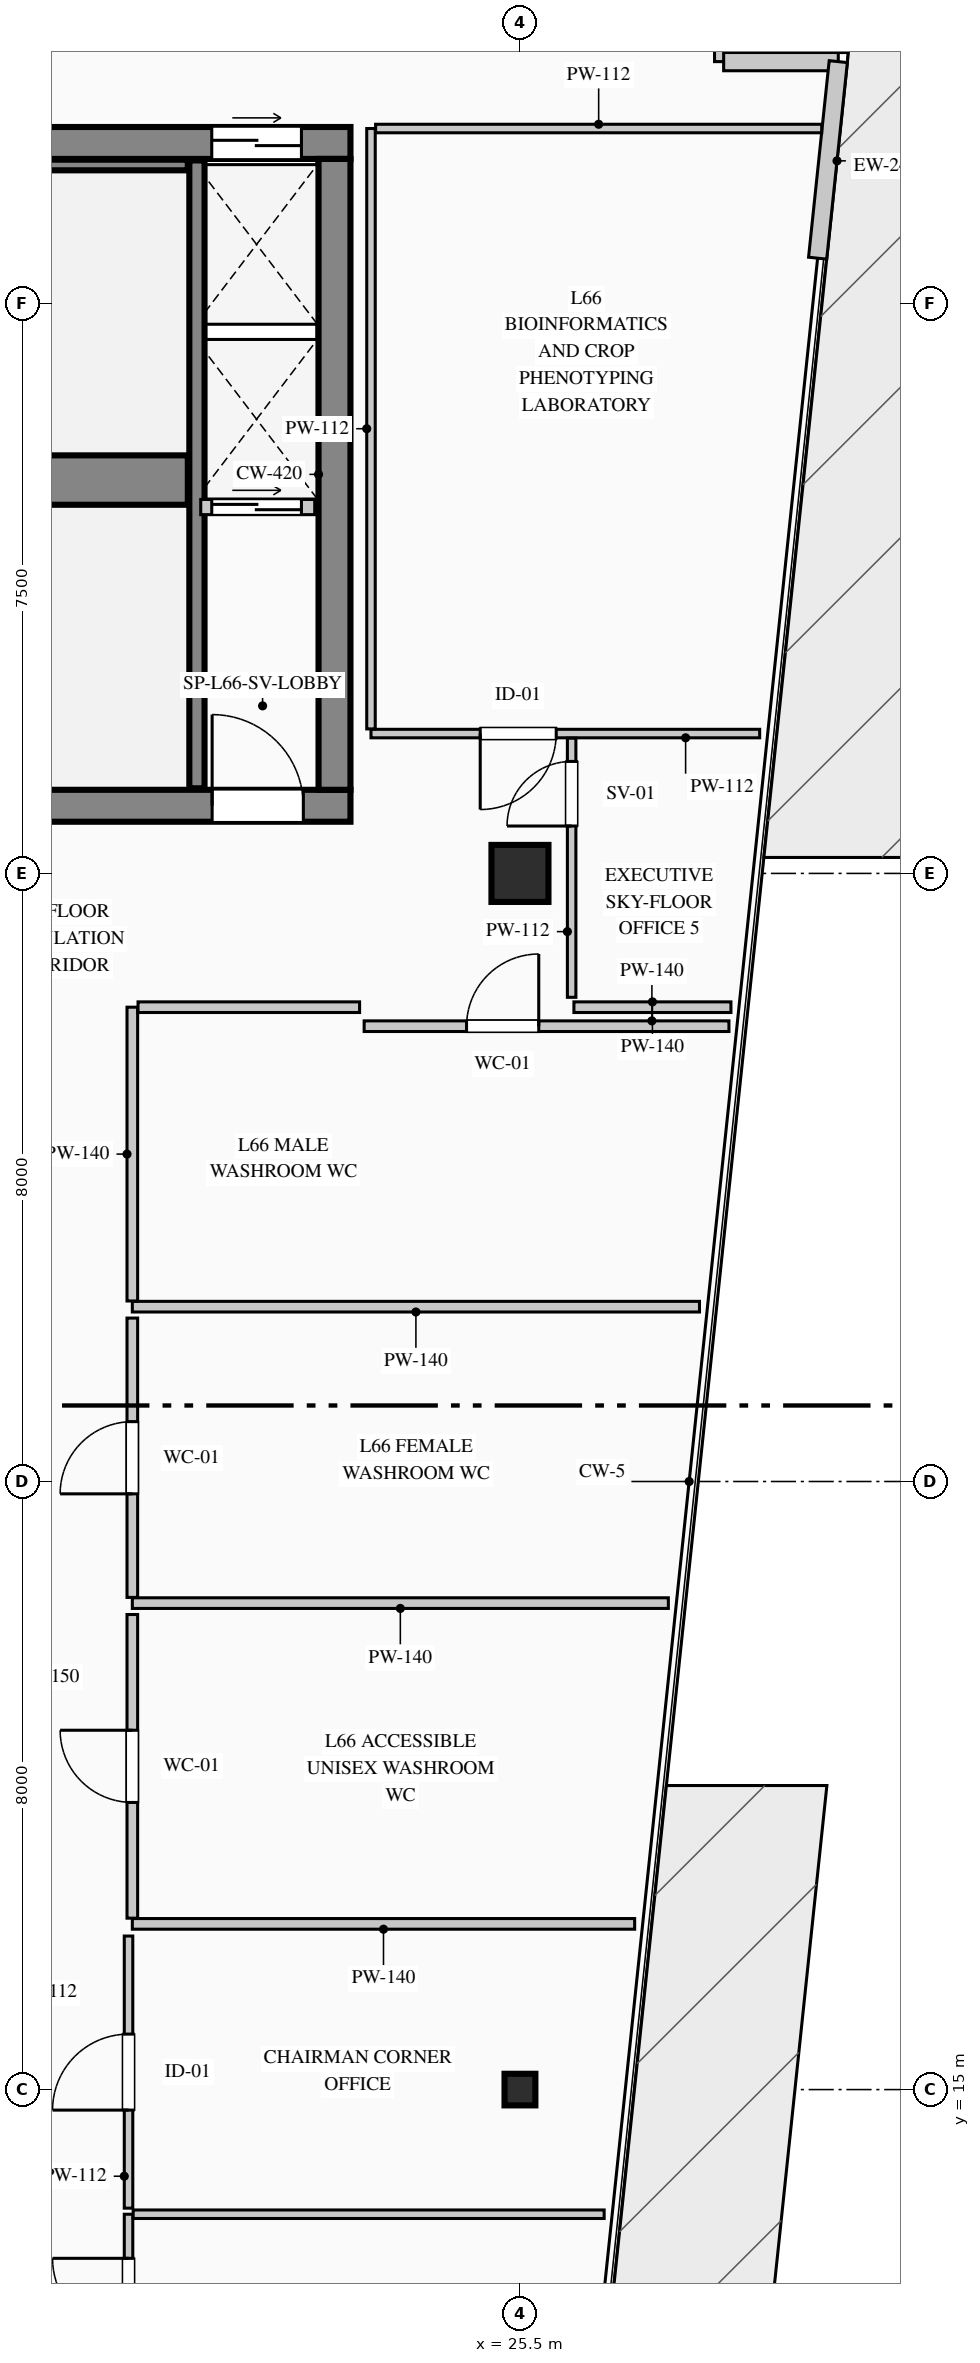
"""IFC4 building model, lengths in metres.
Left out: names, types, materials, properties, quantities, classifications, styles, units other than length and angle.
Written with IfcOpenShell. Run it as: python <this file> out.ifc"""

import sys

from ifc_helpers import new_model, si_unit, direction, frame, frame_2d, origin, origin_2d, place, context, subcontext, project, spatial, rectangle, i_section, extrude, element, fill, save


model = new_model("IFC4")
c1 = context("Model", 3, precision=1e-05, world=origin(), true_north=direction((0.0, 1.0)))
c2 = subcontext(c1, "Body", "Model", "MODEL_VIEW")
j1 = project(units=[si_unit("LENGTHUNIT", "METRE"), si_unit("PLANEANGLEUNIT", "RADIAN")], contexts=[c1])
p1 = place(None, origin())
s1 = spatial("IfcSite", under=j1, at=p1, CompositionType="ELEMENT")
p2 = place(p1, origin())
s2 = spatial("IfcBuilding", under=s1, at=p2, CompositionType="ELEMENT")
p3 = place(p2, frame((0.0, 0.0, 276.45)))
s3 = spatial("IfcBuildingStorey", under=s2, at=p3, CompositionType="ELEMENT", Elevation=276.45)
p4 = place(p3, frame((5.58, 40.61, 0.0), z_axis=(0.0, 0.0, 1.0), x_axis=(1.0, 0.0, 0.0)))
e1 = element("IfcWall", 1, at=p4, inside=s3, PredefinedType="SHEAR", context=c2, shape_type="SweptSolid", body=[
    extrude(rectangle(XDim=17.69, YDim=0.42, at=frame_2d((8.845, 0.0))), origin(), (0.0, 0.0, 1.0), 3.95),
])
p5 = place(p4, frame((15.865, 0.0, 0.0)))
e2 = element("IfcOpeningElement", 2, at=p5, cuts=e1, PredefinedType="OPENING", context=c2, shape_type="SweptSolid", body=[
    extrude(rectangle(XDim=1.18, YDim=2.25, at=frame_2d((0.59, 1.125))), frame((0.0, 0.22, 0.0), z_axis=(0.0, -1.0, 0.0), x_axis=(1.0, 0.0, 0.0)), (0.0, 0.0, 1.0), 0.44),
])
p6 = place(p3, frame((5.58, 31.89, 0.0), z_axis=(0.0, 0.0, 1.0), x_axis=(1.0, 0.0, 0.0)))
e3 = element("IfcWall", 3, at=p6, inside=s3, PredefinedType="SHEAR", context=c2, shape_type="SweptSolid", body=[
    extrude(rectangle(XDim=17.69, YDim=0.42, at=frame_2d((8.845, 0.0))), origin(), (0.0, 0.0, 1.0), 3.95),
])
p7 = place(p6, frame((3.07, 0.0, 0.0)))
e4 = element("IfcOpeningElement", 4, at=p7, cuts=e3, PredefinedType="OPENING", context=c2, shape_type="SweptSolid", body=[
    extrude(rectangle(XDim=1.2, YDim=2.2, at=frame_2d((0.6, 1.1))), frame((0.0, 0.22, 0.0), z_axis=(0.0, -1.0, 0.0), x_axis=(1.0, 0.0, 0.0)), (0.0, 0.0, 1.0), 0.44),
])
p8 = place(p6, frame((6.92, 0.0, 0.0)))
e5 = element("IfcOpeningElement", 5, at=p8, cuts=e3, PredefinedType="OPENING", context=c2, shape_type="SweptSolid", body=[
    extrude(rectangle(XDim=1.2, YDim=2.2, at=frame_2d((0.6, 1.1))), frame((0.0, 0.22, 0.0), z_axis=(0.0, -1.0, 0.0), x_axis=(1.0, 0.0, 0.0)), (0.0, 0.0, 1.0), 0.44),
])
p9 = place(p6, frame((8.77, 0.0, 0.0)))
e6 = element("IfcOpeningElement", 6, at=p9, cuts=e3, PredefinedType="OPENING", context=c2, shape_type="SweptSolid", body=[
    extrude(rectangle(XDim=1.15, YDim=2.2, at=frame_2d((0.575, 1.1))), frame((0.0, 0.22, 0.0), z_axis=(0.0, -1.0, 0.0), x_axis=(1.0, 0.0, 0.0)), (0.0, 0.0, 1.0), 0.44),
])
p10 = place(p6, frame((15.87, 0.0, 0.0)))
e7 = element("IfcOpeningElement", 7, at=p10, cuts=e3, PredefinedType="OPENING", context=c2, shape_type="SweptSolid", body=[
    extrude(rectangle(XDim=1.2, YDim=2.2, at=frame_2d((0.6, 1.1))), frame((0.0, 0.22, 0.0), z_axis=(0.0, -1.0, 0.0), x_axis=(1.0, 0.0, 0.0)), (0.0, 0.0, 1.0), 0.44),
])
p11 = place(p3, frame((23.06, 32.1, 0.0), z_axis=(0.0, 0.0, 1.0), x_axis=(0.0, 1.0, 0.0)))
e8 = element("IfcWall", 8, at=p11, inside=s3, PredefinedType="SHEAR", context=c2, shape_type="SweptSolid", body=[
    extrude(rectangle(XDim=8.3, YDim=0.42, at=frame_2d((4.15, 0.0))), origin(), (0.0, 0.0, 1.0), 3.95),
])
p12 = place(p3, frame((14.12, 36.175, 0.0), z_axis=(0.0, 0.0, 1.0), x_axis=(1.0, 0.0, 0.0)))
e9 = element("IfcWall", 9, at=p12, inside=s3, PredefinedType="SHEAR", context=c2, shape_type="SweptSolid", body=[
    extrude(rectangle(XDim=7.01, YDim=0.65, at=frame_2d((3.505, 0.0))), origin(), (0.0, 0.0, 1.0), 3.95),
])
p13 = place(p3, frame((21.25, 32.12, 0.0), z_axis=(0.0, 0.0, 1.0), x_axis=(0.0, 1.0, 0.0)))
e10 = element("IfcWall", 10, at=p13, inside=s3, PredefinedType="SHEAR", context=c2, shape_type="SweptSolid", body=[
    extrude(rectangle(XDim=8.26, YDim=0.2, at=frame_2d((4.13, 0.0))), origin(), (0.0, 0.0, 1.0), 3.95),
])
p14 = place(p3, frame((14.12, 40.32, 0.0), z_axis=(0.0, 0.0, 1.0), x_axis=(1.0, 0.0, 0.0)))
e11 = element("IfcWall", 11, at=p14, inside=s3, PredefinedType="SHEAR", context=c2, shape_type="SweptSolid", body=[
    extrude(rectangle(XDim=7.01, YDim=0.14, at=frame_2d((3.505, 0.0))), origin(), (0.0, 0.0, 1.0), 3.95),
])
p15 = place(p3, frame((25.5, 15.0, 0.0), z_axis=(0.0, 0.0, 1.0), x_axis=(1.0, 0.0, 0.0)))
e12 = element("IfcColumn", 12, at=p15, inside=s3, PredefinedType="COLUMN", context=c2, shape_type="SweptSolid", body=[
    extrude(i_section(OverallWidth=0.406, OverallDepth=0.416, WebThickness=0.03, FlangeThickness=0.048, FilletRadius=0.015, at=origin_2d()), origin(), (0.0, 0.0, 1.0), 3.95),
])
p16 = place(p3, frame((25.5, 31.0, 0.0), z_axis=(0.0, 0.0, 1.0), x_axis=(1.0, 0.0, 0.0)))
e13 = element("IfcColumn", 13, at=p16, inside=s3, PredefinedType="COLUMN", context=c2, shape_type="SweptSolid", body=[
    extrude(rectangle(XDim=0.75, YDim=0.75, at=origin_2d()), origin(), (0.0, 0.0, 1.0), 3.95),
])
p17 = place(p3, frame((28.18, 43.38, 0.0), z_axis=(0.0, 0.0, 1.0), x_axis=(0.0, -1.0, 0.0)))
e14 = element("IfcWall", 14, at=p17, inside=s3, PredefinedType="STANDARD", context=c2, shape_type="SweptSolid", body=[
    extrude(rectangle(XDim=1.7, YDim=0.24, at=frame_2d((0.85, 0.0))), origin(), (0.0, 0.0, 1.0), 3.7),
])
p18 = place(p3, frame((28.18, 41.68, 0.0), z_axis=(0.0, 0.0, 1.0), x_axis=(1.0, 0.0, 0.0)))
e15 = element("IfcWall", 15, at=p18, inside=s3, PredefinedType="STANDARD", context=c2, shape_type="SweptSolid", body=[
    extrude(rectangle(XDim=1.508, YDim=0.24, at=frame_2d((0.754, 0.0))), origin(), (0.0, 0.0, 1.0), 3.7),
])
p19 = place(p3, frame((29.688, 41.68, 0.0), z_axis=(0.0, 0.0, 1.0), x_axis=(-0.104420821624, -0.994533203071, 0.0)))
e16 = element("IfcWall", 16, at=p19, inside=s3, PredefinedType="STANDARD", context=c2, shape_type="SweptSolid", body=[
    extrude(rectangle(XDim=2.6, YDim=0.24, at=frame_2d((1.3, 0.0))), origin(), (0.0, 0.0, 1.0), 3.7),
])
p20 = place(p3, frame((19.581, 2.62, 0.0), z_axis=(0.0, 0.0, 1.0), x_axis=(-0.077816860153, 0.996967670627, 0.0)))
e17 = element("IfcWall", 17, at=p20, inside=s3, PredefinedType="STANDARD", context=c2, shape_type="SweptSolid", body=[
    extrude(rectangle(XDim=10.281, YDim=0.24, at=frame_2d((5.141, 0.0))), origin(), (0.0, 0.0, 1.0), 3.7),
])
p21 = place(p20, frame((5.755, 0.0, 0.9)))
e18 = element("IfcOpeningElement", 18, at=p21, cuts=e17, PredefinedType="OPENING", context=c2, shape_type="SweptSolid", body=[
    extrude(rectangle(XDim=1.65, YDim=1.95, at=frame_2d((0.825, 0.975))), frame((0.0, 0.13, 0.0), z_axis=(0.0, -1.0, 0.0), x_axis=(1.0, 0.0, 0.0)), (0.0, 0.0, 1.0), 0.26),
])
p22 = place(p3, frame((21.3, 35.82, 0.0), z_axis=(0.0, 0.0, 1.0), x_axis=(1.0, 0.0, 0.0)))
e19 = element("IfcWall", 19, at=p22, inside=s3, PredefinedType="PARTITIONING", context=c2, shape_type="SweptSolid", body=[
    extrude(rectangle(XDim=1.5, YDim=0.2, at=frame_2d((0.75, 0.0))), origin(), (0.0, 0.0, 1.0), 3.7),
])
p23 = place(p22, frame((0.145, 0.0, 0.0)))
e20 = element("IfcOpeningElement", 20, at=p23, cuts=e19, PredefinedType="OPENING", context=c2, shape_type="SweptSolid", body=[
    extrude(rectangle(XDim=1.18, YDim=2.25, at=frame_2d((0.59, 1.125))), frame((0.0, 0.11, 0.0), z_axis=(0.0, -1.0, 0.0), x_axis=(1.0, 0.0, 0.0)), (0.0, 0.0, 1.0), 0.22),
])
p24 = place(p3, frame((28.654, 32.84, 0.0), z_axis=(0.0, 0.0, 1.0), x_axis=(-1.0, 0.0, 0.0)))
e21 = element("IfcWall", 21, at=p24, inside=s3, PredefinedType="PARTITIONING", context=c2, shape_type="SweptSolid", body=[
    extrude(rectangle(XDim=5.114, YDim=0.112, at=frame_2d((2.557, 0.0))), origin(), (0.0, 0.0, 1.0), 3.7),
])
p25 = place(p24, frame((2.677, 0.0, 0.0)))
e22 = element("IfcOpeningElement", 22, at=p25, cuts=e21, PredefinedType="OPENING", context=c2, shape_type="SweptSolid", body=[
    extrude(rectangle(XDim=1.0, YDim=2.15, at=frame_2d((0.5, 1.075))), frame((0.0, 0.066, 0.0), z_axis=(0.0, -1.0, 0.0), x_axis=(1.0, 0.0, 0.0)), (0.0, 0.0, 1.0), 0.132),
])
p26 = place(p3, frame((23.54, 32.901, 0.0), z_axis=(0.0, 0.0, 1.0), x_axis=(0.0, 1.0, 0.0)))
e23 = element("IfcWall", 23, at=p26, inside=s3, PredefinedType="PARTITIONING", context=c2, shape_type="SweptSolid", body=[
    extrude(rectangle(XDim=7.899, YDim=0.112, at=frame_2d((3.95, 0.0))), origin(), (0.0, 0.0, 1.0), 3.7),
])
p27 = place(p3, frame((23.601, 40.8, 0.0), z_axis=(0.0, 0.0, 1.0), x_axis=(1.0, 0.0, 0.0)))
e24 = element("IfcWall", 24, at=p27, inside=s3, PredefinedType="PARTITIONING", context=c2, shape_type="SweptSolid", body=[
    extrude(rectangle(XDim=5.869, YDim=0.112, at=frame_2d((2.935, 0.0))), origin(), (0.0, 0.0, 1.0), 3.7),
])
p28 = place(p3, frame((23.45, 28.99, 0.0), z_axis=(0.0, 0.0, 1.0), x_axis=(1.0, 0.0, 0.0)))
e25 = element("IfcWall", 25, at=p28, inside=s3, PredefinedType="PARTITIONING", context=c2, shape_type="SweptSolid", body=[
    extrude(rectangle(XDim=4.8, YDim=0.14, at=frame_2d((2.4, 0.0))), origin(), (0.0, 0.0, 1.0), 3.7),
])
p29 = place(p28, frame((1.347, 0.0, 0.0)))
e26 = element("IfcOpeningElement", 26, at=p29, cuts=e25, PredefinedType="OPENING", context=c2, shape_type="SweptSolid", body=[
    extrude(rectangle(XDim=0.95, YDim=2.15, at=frame_2d((0.475, 1.075))), frame((0.0, 0.08, 0.0), z_axis=(0.0, -1.0, 0.0), x_axis=(1.0, 0.0, 0.0)), (0.0, 0.0, 1.0), 0.16),
])
p30 = place(p3, frame((26.21, 29.24, 0.0), z_axis=(0.0, 0.0, 1.0), x_axis=(1.0, 0.0, 0.0)))
e27 = element("IfcWall", 27, at=p30, inside=s3, PredefinedType="PARTITIONING", context=c2, shape_type="SweptSolid", body=[
    extrude(rectangle(XDim=2.066, YDim=0.14, at=frame_2d((1.033, 0.0))), origin(), (0.0, 0.0, 1.0), 3.7),
])
p31 = place(p3, frame((27.862, 25.3, 0.0), z_axis=(0.0, 0.0, 1.0), x_axis=(-1.0, 0.0, 0.0)))
e28 = element("IfcWall", 28, at=p31, inside=s3, PredefinedType="PARTITIONING", context=c2, shape_type="SweptSolid", body=[
    extrude(rectangle(XDim=7.462, YDim=0.14, at=frame_2d((3.731, 0.0))), origin(), (0.0, 0.0, 1.0), 3.7),
])
p32 = place(p3, frame((20.4, 25.375, 0.0), z_axis=(0.0, 0.0, 1.0), x_axis=(0.0, 1.0, 0.0)))
e29 = element("IfcWall", 29, at=p32, inside=s3, PredefinedType="PARTITIONING", context=c2, shape_type="SweptSolid", body=[
    extrude(rectangle(XDim=3.865, YDim=0.14, at=frame_2d((1.933, 0.0))), origin(), (0.0, 0.0, 1.0), 3.7),
])
p33 = place(p3, frame((20.475, 29.24, 0.0), z_axis=(0.0, 0.0, 1.0), x_axis=(1.0, 0.0, 0.0)))
e30 = element("IfcWall", 30, at=p33, inside=s3, PredefinedType="PARTITIONING", context=c2, shape_type="SweptSolid", body=[
    extrude(rectangle(XDim=2.915, YDim=0.14, at=frame_2d((1.458, 0.0))), origin(), (0.0, 0.0, 1.0), 3.7),
])
p34 = place(p3, frame((27.452, 21.4, 0.0), z_axis=(0.0, 0.0, 1.0), x_axis=(-1.0, 0.0, 0.0)))
e31 = element("IfcWall", 31, at=p34, inside=s3, PredefinedType="PARTITIONING", context=c2, shape_type="SweptSolid", body=[
    extrude(rectangle(XDim=7.052, YDim=0.14, at=frame_2d((3.526, 0.0))), origin(), (0.0, 0.0, 1.0), 3.7),
])
p35 = place(p3, frame((20.4, 21.475, 0.0), z_axis=(0.0, 0.0, 1.0), x_axis=(0.0, 1.0, 0.0)))
e32 = element("IfcWall", 32, at=p35, inside=s3, PredefinedType="PARTITIONING", context=c2, shape_type="SweptSolid", body=[
    extrude(rectangle(XDim=3.675, YDim=0.14, at=frame_2d((1.837, 0.0))), origin(), (0.0, 0.0, 1.0), 3.7),
])
p36 = place(p35, frame((1.363, 0.0, 0.0)))
e33 = element("IfcOpeningElement", 33, at=p36, cuts=e32, PredefinedType="OPENING", context=c2, shape_type="SweptSolid", body=[
    extrude(rectangle(XDim=0.95, YDim=2.15, at=frame_2d((0.475, 1.075))), frame((0.0, 0.08, 0.0), z_axis=(0.0, -1.0, 0.0), x_axis=(1.0, 0.0, 0.0)), (0.0, 0.0, 1.0), 0.16),
])
p37 = place(p3, frame((27.009, 17.18, 0.0), z_axis=(0.0, 0.0, 1.0), x_axis=(-1.0, 0.0, 0.0)))
e34 = element("IfcWall", 34, at=p37, inside=s3, PredefinedType="PARTITIONING", context=c2, shape_type="SweptSolid", body=[
    extrude(rectangle(XDim=6.609, YDim=0.14, at=frame_2d((3.305, 0.0))), origin(), (0.0, 0.0, 1.0), 3.7),
])
p38 = place(p3, frame((20.4, 17.255, 0.0), z_axis=(0.0, 0.0, 1.0), x_axis=(0.0, 1.0, 0.0)))
e35 = element("IfcWall", 35, at=p38, inside=s3, PredefinedType="PARTITIONING", context=c2, shape_type="SweptSolid", body=[
    extrude(rectangle(XDim=3.995, YDim=0.14, at=frame_2d((1.998, 0.0))), origin(), (0.0, 0.0, 1.0), 3.7),
])
p39 = place(p38, frame((1.522, 0.0, 0.0)))
e36 = element("IfcOpeningElement", 36, at=p39, cuts=e35, PredefinedType="OPENING", context=c2, shape_type="SweptSolid", body=[
    extrude(rectangle(XDim=0.95, YDim=2.15, at=frame_2d((0.475, 1.075))), frame((0.0, 0.08, 0.0), z_axis=(0.0, -1.0, 0.0), x_axis=(1.0, 0.0, 0.0)), (0.0, 0.0, 1.0), 0.16),
])
p40 = place(p3, frame((20.35, 11.2, 0.0), z_axis=(0.0, 0.0, 1.0), x_axis=(0.0, 1.0, 0.0)))
e37 = element("IfcWall", 37, at=p40, inside=s3, PredefinedType="PARTITIONING", context=c2, shape_type="SweptSolid", body=[
    extrude(rectangle(XDim=2.16, YDim=0.112, at=frame_2d((1.08, 0.0))), origin(), (0.0, 0.0, 1.0), 3.7),
])
p41 = place(p40, frame((0.58, 0.0, 0.0)))
e38 = element("IfcOpeningElement", 38, at=p41, cuts=e37, PredefinedType="OPENING", context=c2, shape_type="SweptSolid", body=[
    extrude(rectangle(XDim=1.0, YDim=2.15, at=frame_2d((0.5, 1.075))), frame((0.0, 0.066, 0.0), z_axis=(0.0, -1.0, 0.0), x_axis=(1.0, 0.0, 0.0)), (0.0, 0.0, 1.0), 0.132),
])
p42 = place(p3, frame((20.411, 13.36, 0.0), z_axis=(0.0, 0.0, 1.0), x_axis=(1.0, 0.0, 0.0)))
e39 = element("IfcWall", 39, at=p42, inside=s3, PredefinedType="PARTITIONING", context=c2, shape_type="SweptSolid", body=[
    extrude(rectangle(XDim=6.197, YDim=0.112, at=frame_2d((3.099, 0.0))), origin(), (0.0, 0.0, 1.0), 3.7),
])
p43 = place(p3, frame((20.35, 13.44, 0.0), z_axis=(0.0, 0.0, 1.0), x_axis=(0.0, 1.0, 0.0)))
e40 = element("IfcWall", 40, at=p43, inside=s3, PredefinedType="PARTITIONING", context=c2, shape_type="SweptSolid", body=[
    extrude(rectangle(XDim=3.58, YDim=0.112, at=frame_2d((1.79, 0.0))), origin(), (0.0, 0.0, 1.0), 3.7),
])
p44 = place(p43, frame((1.29, 0.0, 0.0)))
e41 = element("IfcOpeningElement", 41, at=p44, cuts=e40, PredefinedType="OPENING", context=c2, shape_type="SweptSolid", body=[
    extrude(rectangle(XDim=1.0, YDim=2.15, at=frame_2d((0.5, 1.075))), frame((0.0, 0.066, 0.0), z_axis=(0.0, -1.0, 0.0), x_axis=(1.0, 0.0, 0.0)), (0.0, 0.0, 1.0), 0.132),
])
p45 = place(p3, frame((26.18, 29.37, 0.0), z_axis=(0.0, 0.0, 1.0), x_axis=(0.0, 1.0, 0.0)))
e42 = element("IfcWall", 42, at=p45, inside=s3, PredefinedType="PARTITIONING", context=c2, shape_type="SweptSolid", body=[
    extrude(rectangle(XDim=3.409, YDim=0.112, at=frame_2d((1.705, 0.0))), origin(), (0.0, 0.0, 1.0), 3.7),
])
p46 = place(p45, frame((2.253, 0.0, 0.0)))
e43 = element("IfcOpeningElement", 43, at=p46, cuts=e42, PredefinedType="OPENING", context=c2, shape_type="SweptSolid", body=[
    extrude(rectangle(XDim=0.85, YDim=2.1, at=frame_2d((0.425, 1.05))), frame((0.0, 0.066, 0.0), z_axis=(0.0, -1.0, 0.0), x_axis=(1.0, 0.0, 0.0)), (0.0, 0.0, 1.0), 0.132),
])
p47 = place(p10, origin())
e44 = element("IfcDoor", 44, at=p47, inside=s3, OperationType="SINGLE_SWING_LEFT", PredefinedType="DOOR", context=c2, shape_type="SweptSolid", body=[
    extrude(rectangle(XDim=1.2, YDim=2.2, at=frame_2d((0.6, 1.1))), frame((0.0, 0.025, 0.0), z_axis=(0.0, -1.0, 0.0), x_axis=(1.0, 0.0, 0.0)), (0.0, 0.0, 1.0), 0.05),
])
fill(e7, e44)
p48 = place(p5, origin())
e45 = element("IfcDoor", 45, at=p48, inside=s3, OperationType="DOUBLE_DOOR_SLIDING", PredefinedType="DOOR", context=c2, shape_type="SweptSolid", body=[
    extrude(rectangle(XDim=1.18, YDim=2.25, at=frame_2d((0.59, 1.125))), frame((0.0, 0.025, 0.0), z_axis=(0.0, -1.0, 0.0), x_axis=(1.0, 0.0, 0.0)), (0.0, 0.0, 1.0), 0.05),
])
fill(e2, e45)
p49 = place(p23, origin())
e46 = element("IfcDoor", 46, at=p49, inside=s3, OperationType="DOUBLE_DOOR_SLIDING", PredefinedType="DOOR", context=c2, shape_type="SweptSolid", body=[
    extrude(rectangle(XDim=1.18, YDim=2.25, at=frame_2d((0.59, 1.125))), frame((0.0, 0.025, 0.0), z_axis=(0.0, -1.0, 0.0), x_axis=(1.0, 0.0, 0.0)), (0.0, 0.0, 1.0), 0.05),
])
fill(e20, e46)
p50 = place(p25, origin())
e47 = element("IfcDoor", 47, at=p50, inside=s3, OperationType="SINGLE_SWING_RIGHT", PredefinedType="DOOR", context=c2, shape_type="SweptSolid", body=[
    extrude(rectangle(XDim=1.0, YDim=2.15, at=frame_2d((0.5, 1.075))), frame((0.0, 0.025, 0.0), z_axis=(0.0, -1.0, 0.0), x_axis=(1.0, 0.0, 0.0)), (0.0, 0.0, 1.0), 0.05),
])
fill(e22, e47)
p51 = place(p29, origin())
e48 = element("IfcDoor", 48, at=p51, inside=s3, OperationType="SINGLE_SWING_RIGHT", PredefinedType="DOOR", context=c2, shape_type="SweptSolid", body=[
    extrude(rectangle(XDim=0.95, YDim=2.15, at=frame_2d((0.475, 1.075))), frame((0.0, 0.025, 0.0), z_axis=(0.0, -1.0, 0.0), x_axis=(1.0, 0.0, 0.0)), (0.0, 0.0, 1.0), 0.05),
])
fill(e26, e48)
p52 = place(p36, origin())
e49 = element("IfcDoor", 49, at=p52, inside=s3, OperationType="SINGLE_SWING_LEFT", PredefinedType="DOOR", context=c2, shape_type="SweptSolid", body=[
    extrude(rectangle(XDim=0.95, YDim=2.15, at=frame_2d((0.475, 1.075))), frame((0.0, 0.025, 0.0), z_axis=(0.0, -1.0, 0.0), x_axis=(1.0, 0.0, 0.0)), (0.0, 0.0, 1.0), 0.05),
])
fill(e33, e49)
p53 = place(p39, origin())
e50 = element("IfcDoor", 50, at=p53, inside=s3, OperationType="SINGLE_SWING_RIGHT", PredefinedType="DOOR", context=c2, shape_type="SweptSolid", body=[
    extrude(rectangle(XDim=0.95, YDim=2.15, at=frame_2d((0.475, 1.075))), frame((0.0, 0.025, 0.0), z_axis=(0.0, -1.0, 0.0), x_axis=(1.0, 0.0, 0.0)), (0.0, 0.0, 1.0), 0.05),
])
fill(e36, e50)
p54 = place(p41, origin())
e51 = element("IfcDoor", 51, at=p54, inside=s3, OperationType="SINGLE_SWING_RIGHT", PredefinedType="DOOR", context=c2, shape_type="SweptSolid", body=[
    extrude(rectangle(XDim=1.0, YDim=2.15, at=frame_2d((0.5, 1.075))), frame((0.0, 0.025, 0.0), z_axis=(0.0, -1.0, 0.0), x_axis=(1.0, 0.0, 0.0)), (0.0, 0.0, 1.0), 0.05),
])
fill(e38, e51)
p55 = place(p44, origin())
e52 = element("IfcDoor", 52, at=p55, inside=s3, OperationType="SINGLE_SWING_LEFT", PredefinedType="DOOR", context=c2, shape_type="SweptSolid", body=[
    extrude(rectangle(XDim=1.0, YDim=2.15, at=frame_2d((0.5, 1.075))), frame((0.0, 0.025, 0.0), z_axis=(0.0, -1.0, 0.0), x_axis=(1.0, 0.0, 0.0)), (0.0, 0.0, 1.0), 0.05),
])
fill(e41, e52)
p56 = place(p46, origin())
e53 = element("IfcDoor", 53, at=p56, inside=s3, OperationType="SINGLE_SWING_LEFT", PredefinedType="DOOR", context=c2, shape_type="SweptSolid", body=[
    extrude(rectangle(XDim=0.85, YDim=2.1, at=frame_2d((0.425, 1.05))), frame((0.0, 0.025, 0.0), z_axis=(0.0, -1.0, 0.0), x_axis=(1.0, 0.0, 0.0)), (0.0, 0.0, 1.0), 0.05),
])
fill(e43, e53)
save(model, sys.argv[1])
